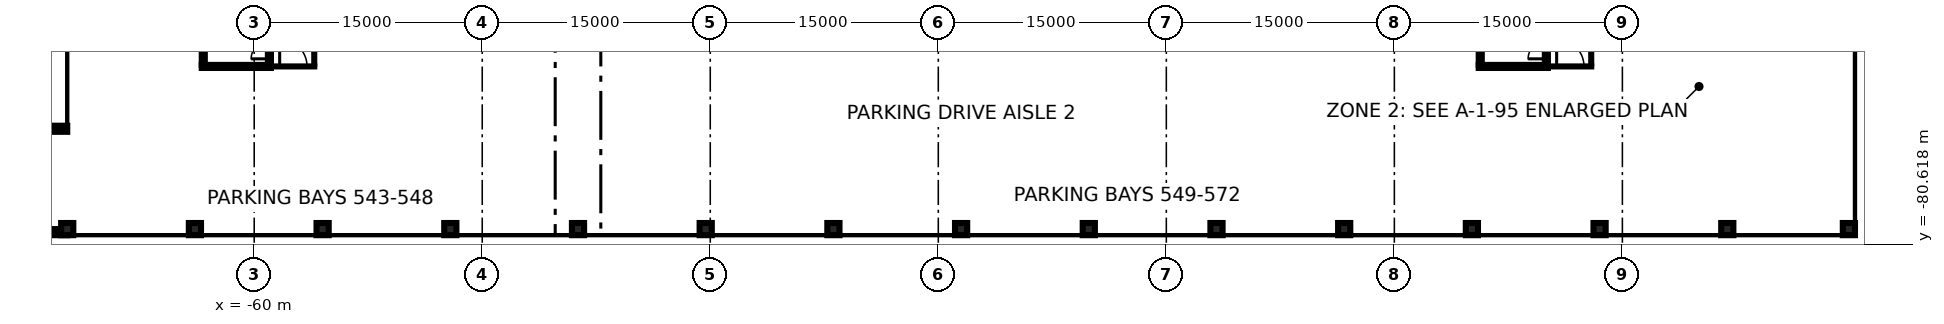
"""IFC4 building model, lengths in metres.
Left out: names, types, materials, properties, quantities, classifications, styles, units other than length and angle.
Written with IfcOpenShell. Run it as: python <this file> out.ifc"""

import sys

from ifc_helpers import new_model, si_unit, direction, frame, frame_2d, origin, origin_2d, place, context, subcontext, project, spatial, rectangle, extrude, element, fill, save


model = new_model("IFC4")
c1 = context("Model", 3, precision=1e-05, world=origin(), true_north=direction((0.0, 1.0)))
c2 = subcontext(c1, "Body", "Model", "MODEL_VIEW")
j1 = project(units=[si_unit("LENGTHUNIT", "METRE"), si_unit("PLANEANGLEUNIT", "RADIAN")], contexts=[c1])
p1 = place(None, origin())
s1 = spatial("IfcSite", under=j1, at=p1, CompositionType="ELEMENT")
p2 = place(p1, origin())
s2 = spatial("IfcBuilding", under=s1, at=p2, CompositionType="ELEMENT")
p3 = place(p2, frame((0.0, 0.0, -12.0)))
s3 = spatial("IfcBuildingStorey", under=s2, at=p3, CompositionType="ELEMENT", Elevation=-12.0)
p4 = place(p3, frame((-123.6, -80.45, 0.0), z_axis=(0.0, 0.0, 1.0), x_axis=(1.0, 0.0, 0.0)))
e1 = element("IfcWall", 1, at=p4, inside=s3, PredefinedType="USERDEFINED", context=c2, shape_type="SweptSolid", body=[
    extrude(rectangle(XDim=169.8, YDim=0.9, at=frame_2d((84.9, 0.0))), origin(), (0.0, 0.0, 1.0), 11.55),
])
p5 = place(p3, frame((45.75, -80.0, 0.0), z_axis=(0.0, 0.0, 1.0), x_axis=(0.0, 1.0, 0.0)))
e2 = element("IfcWall", 2, at=p5, inside=s3, PredefinedType="USERDEFINED", context=c2, shape_type="SweptSolid", body=[
    extrude(rectangle(XDim=160.0, YDim=0.9, at=frame_2d((80.0, 0.0))), origin(), (0.0, 0.0, 1.0), 11.55),
])
p6 = place(p2, frame((0.0, 0.0, -7.2)))
s4 = spatial("IfcBuildingStorey", under=s2, at=p6, CompositionType="ELEMENT", Elevation=-7.2)
for number, where, z_axis, x_axis in (
    (3, (-72.3, -79.6, -0.4), (0.0, 0.0, 1.0), (1.0, 0.0, 0.0)),
    (4, (-63.9, -79.6, -0.4), (0.0, 0.0, 1.0), (1.0, 0.0, 0.0)),
    (5, (-55.5, -79.6, -0.4), (0.0, 0.0, 1.0), (1.0, 0.0, 0.0)),
    (6, (-47.1, -79.6, -0.4), (0.0, 0.0, 1.0), (1.0, 0.0, 0.0)),
    (7, (-38.7, -79.6, -0.4), (0.0, 0.0, 1.0), (1.0, 0.0, 0.0)),
    (8, (-30.3, -79.6, -0.4), (0.0, 0.0, 1.0), (1.0, 0.0, 0.0)),
    (9, (-21.9, -79.6, -0.4), (0.0, 0.0, 1.0), (1.0, 0.0, 0.0)),
    (10, (-13.5, -79.6, -0.4), (0.0, 0.0, 1.0), (1.0, 0.0, 0.0)),
    (11, (-5.1, -79.6, -0.4), (0.0, 0.0, 1.0), (1.0, 0.0, 0.0)),
    (12, (3.3, -79.6, -0.4), (0.0, 0.0, 1.0), (1.0, 0.0, 0.0)),
    (13, (11.7, -79.6, -0.4), (0.0, 0.0, 1.0), (1.0, 0.0, 0.0)),
    (14, (20.1, -79.6, -0.4), (0.0, 0.0, 1.0), (1.0, 0.0, 0.0)),
    (15, (28.5, -79.6, -0.4), (0.0, 0.0, 1.0), (1.0, 0.0, 0.0)),
    (16, (36.9, -79.6, -0.4), (0.0, 0.0, 1.0), (1.0, 0.0, 0.0)),
    (17, (44.9, -79.6, -0.4), (0.0, 0.0, 1.0), (1.0, 0.0, 0.0)),
):
    element("IfcColumn", number, at=place(p6, frame(where, z_axis=z_axis, x_axis=x_axis)), inside=s4, PredefinedType="COLUMN", context=c2, shape_type="SweptSolid", body=[
        extrude(rectangle(XDim=0.8, YDim=0.8, at=origin_2d()), origin(), (0.0, 0.0, 1.0), 3.6),
    ])
p7 = place(p6, frame((-58.9, -68.9, 0.0), z_axis=(0.0, 0.0, 1.0), x_axis=(1.0, 0.0, 0.0)))
e18 = element("IfcWall", 18, at=p7, inside=s4, PredefinedType="PARTITIONING", context=c2, shape_type="SweptSolid", body=[
    extrude(rectangle(XDim=2.95, YDim=0.2, at=frame_2d((1.475, 0.0))), origin(), (0.0, 0.0, 1.0), 3.2),
])
p8 = place(p7, frame((0.575, 0.0, 0.0)))
e19 = element("IfcOpeningElement", 19, at=p8, cuts=e18, PredefinedType="OPENING", context=c2, shape_type="SweptSolid", body=[
    extrude(rectangle(XDim=1.8, YDim=2.1, at=frame_2d((0.9, 1.05))), frame((0.0, 0.11, 0.0), z_axis=(0.0, -1.0, 0.0), x_axis=(1.0, 0.0, 0.0)), (0.0, 0.0, 1.0), 0.22),
])
p9 = place(p6, frame((-56.05, -68.8, 0.0), z_axis=(0.0, 0.0, 1.0), x_axis=(0.0, 1.0, 0.0)))
e20 = element("IfcWall", 20, at=p9, inside=s4, PredefinedType="PARTITIONING", context=c2, shape_type="SweptSolid", body=[
    extrude(rectangle(XDim=3.6, YDim=0.2, at=frame_2d((1.8, 0.0))), origin(), (0.0, 0.0, 1.0), 3.2),
])
p10 = place(p6, frame((25.1, -68.9, 0.0), z_axis=(0.0, 0.0, 1.0), x_axis=(1.0, 0.0, 0.0)))
e21 = element("IfcWall", 21, at=p10, inside=s4, PredefinedType="PARTITIONING", context=c2, shape_type="SweptSolid", body=[
    extrude(rectangle(XDim=2.95, YDim=0.2, at=frame_2d((1.475, 0.0))), origin(), (0.0, 0.0, 1.0), 3.2),
])
p11 = place(p10, frame((0.575, 0.0, 0.0)))
e22 = element("IfcOpeningElement", 22, at=p11, cuts=e21, PredefinedType="OPENING", context=c2, shape_type="SweptSolid", body=[
    extrude(rectangle(XDim=1.8, YDim=2.1, at=frame_2d((0.9, 1.05))), frame((0.0, 0.11, 0.0), z_axis=(0.0, -1.0, 0.0), x_axis=(1.0, 0.0, 0.0)), (0.0, 0.0, 1.0), 0.22),
])
p12 = place(p6, frame((27.95, -68.8, 0.0), z_axis=(0.0, 0.0, 1.0), x_axis=(0.0, 1.0, 0.0)))
e23 = element("IfcWall", 23, at=p12, inside=s4, PredefinedType="PARTITIONING", context=c2, shape_type="SweptSolid", body=[
    extrude(rectangle(XDim=3.6, YDim=0.2, at=frame_2d((1.8, 0.0))), origin(), (0.0, 0.0, 1.0), 3.2),
])
p13 = place(p6, frame((-63.35, -68.8, 0.0), z_axis=(0.0, 0.0, 1.0), x_axis=(0.0, 1.0, 0.0)))
e24 = element("IfcWall", 24, at=p13, inside=s4, PredefinedType="SOLIDWALL", context=c2, shape_type="SweptSolid", body=[
    extrude(rectangle(XDim=9.6, YDim=0.2, at=frame_2d((4.8, 0.0))), origin(), (0.0, 0.0, 1.0), 3.2),
])
p14 = place(p6, frame((-59.0, -68.8, 0.0), z_axis=(0.0, 0.0, 1.0), x_axis=(0.0, 1.0, 0.0)))
e25 = element("IfcWall", 25, at=p14, inside=s4, PredefinedType="SOLIDWALL", context=c2, shape_type="SweptSolid", body=[
    extrude(rectangle(XDim=9.6, YDim=0.2, at=frame_2d((4.8, 0.0))), origin(), (0.0, 0.0, 1.0), 3.2),
])
p15 = place(p14, frame((0.4, 0.0, 0.0)))
e26 = element("IfcOpeningElement", 26, at=p15, cuts=e25, PredefinedType="OPENING", context=c2, shape_type="SweptSolid", body=[
    extrude(rectangle(XDim=1.2, YDim=2.1, at=frame_2d((0.6, 1.05))), frame((0.0, 0.11, 0.0), z_axis=(0.0, -1.0, 0.0), x_axis=(1.0, 0.0, 0.0)), (0.0, 0.0, 1.0), 0.22),
])
p16 = place(p6, frame((-58.9, -68.9, 0.0), z_axis=(0.0, 0.0, 1.0), x_axis=(-1.0, 0.0, 0.0)))
e27 = element("IfcWall", 27, at=p16, inside=s4, PredefinedType="SOLIDWALL", context=c2, shape_type="SweptSolid", body=[
    extrude(rectangle(XDim=4.55, YDim=0.2, at=frame_2d((2.275, 0.0))), origin(), (0.0, 0.0, 1.0), 3.2),
])
p17 = place(p6, frame((20.65, -68.8, 0.0), z_axis=(0.0, 0.0, 1.0), x_axis=(0.0, 1.0, 0.0)))
e28 = element("IfcWall", 28, at=p17, inside=s4, PredefinedType="SOLIDWALL", context=c2, shape_type="SweptSolid", body=[
    extrude(rectangle(XDim=9.6, YDim=0.2, at=frame_2d((4.8, 0.0))), origin(), (0.0, 0.0, 1.0), 3.2),
])
p18 = place(p6, frame((25.0, -68.8, 0.0), z_axis=(0.0, 0.0, 1.0), x_axis=(0.0, 1.0, 0.0)))
e29 = element("IfcWall", 29, at=p18, inside=s4, PredefinedType="SOLIDWALL", context=c2, shape_type="SweptSolid", body=[
    extrude(rectangle(XDim=9.6, YDim=0.2, at=frame_2d((4.8, 0.0))), origin(), (0.0, 0.0, 1.0), 3.2),
])
p19 = place(p18, frame((0.4, 0.0, 0.0)))
e30 = element("IfcOpeningElement", 30, at=p19, cuts=e29, PredefinedType="OPENING", context=c2, shape_type="SweptSolid", body=[
    extrude(rectangle(XDim=1.2, YDim=2.1, at=frame_2d((0.6, 1.05))), frame((0.0, 0.11, 0.0), z_axis=(0.0, -1.0, 0.0), x_axis=(1.0, 0.0, 0.0)), (0.0, 0.0, 1.0), 0.22),
])
p20 = place(p6, frame((25.1, -68.9, 0.0), z_axis=(0.0, 0.0, 1.0), x_axis=(-1.0, 0.0, 0.0)))
e31 = element("IfcWall", 31, at=p20, inside=s4, PredefinedType="SOLIDWALL", context=c2, shape_type="SweptSolid", body=[
    extrude(rectangle(XDim=4.55, YDim=0.2, at=frame_2d((2.275, 0.0))), origin(), (0.0, 0.0, 1.0), 3.2),
])
p21 = place(p6, frame((-114.3, -79.8, 0.0), z_axis=(0.0, 0.0, 1.0), x_axis=(1.0, 0.0, 0.0)))
e32 = element("IfcWall", 32, at=p21, inside=s4, PredefinedType="SOLIDWALL", context=c2, shape_type="SweptSolid", body=[
    extrude(rectangle(XDim=42.0, YDim=0.4, at=frame_2d((21.0, 0.0))), origin(), (0.0, 0.0, 1.0), 3.2),
])
p22 = place(p6, frame((-75.6, -73.0, 0.0), z_axis=(0.0, 0.0, 1.0), x_axis=(1.0, 0.0, 0.0)))
e33 = element("IfcWall", 33, at=p22, inside=s4, PredefinedType="SOLIDWALL", context=c2, shape_type="SweptSolid", body=[
    extrude(rectangle(XDim=3.3, YDim=0.4, at=frame_2d((1.65, 0.0))), origin(), (0.0, 0.0, 1.0), 3.2),
])
p23 = place(p8, origin())
e34 = element("IfcDoor", 34, at=p23, inside=s4, OperationType="DOUBLE_DOOR_SINGLE_SWING", PredefinedType="DOOR", context=c2, shape_type="SweptSolid", body=[
    extrude(rectangle(XDim=1.8, YDim=2.1, at=frame_2d((0.9, 1.05))), frame((0.0, 0.025, 0.0), z_axis=(0.0, -1.0, 0.0), x_axis=(1.0, 0.0, 0.0)), (0.0, 0.0, 1.0), 0.05),
])
fill(e19, e34)
p24 = place(p11, origin())
e35 = element("IfcDoor", 35, at=p24, inside=s4, OperationType="DOUBLE_DOOR_SINGLE_SWING", PredefinedType="DOOR", context=c2, shape_type="SweptSolid", body=[
    extrude(rectangle(XDim=1.8, YDim=2.1, at=frame_2d((0.9, 1.05))), frame((0.0, 0.025, 0.0), z_axis=(0.0, -1.0, 0.0), x_axis=(1.0, 0.0, 0.0)), (0.0, 0.0, 1.0), 0.05),
])
fill(e22, e35)
p25 = place(p15, origin())
e36 = element("IfcDoor", 36, at=p25, inside=s4, OperationType="SINGLE_SWING_LEFT", PredefinedType="DOOR", context=c2, shape_type="SweptSolid", body=[
    extrude(rectangle(XDim=1.2, YDim=2.1, at=frame_2d((0.6, 1.05))), frame((0.0, 0.025, 0.0), z_axis=(0.0, -1.0, 0.0), x_axis=(1.0, 0.0, 0.0)), (0.0, 0.0, 1.0), 0.05),
])
fill(e26, e36)
p26 = place(p19, origin())
e37 = element("IfcDoor", 37, at=p26, inside=s4, OperationType="SINGLE_SWING_LEFT", PredefinedType="DOOR", context=c2, shape_type="SweptSolid", body=[
    extrude(rectangle(XDim=1.2, YDim=2.1, at=frame_2d((0.6, 1.05))), frame((0.0, 0.025, 0.0), z_axis=(0.0, -1.0, 0.0), x_axis=(1.0, 0.0, 0.0)), (0.0, 0.0, 1.0), 0.05),
])
fill(e30, e37)
save(model, sys.argv[1])
